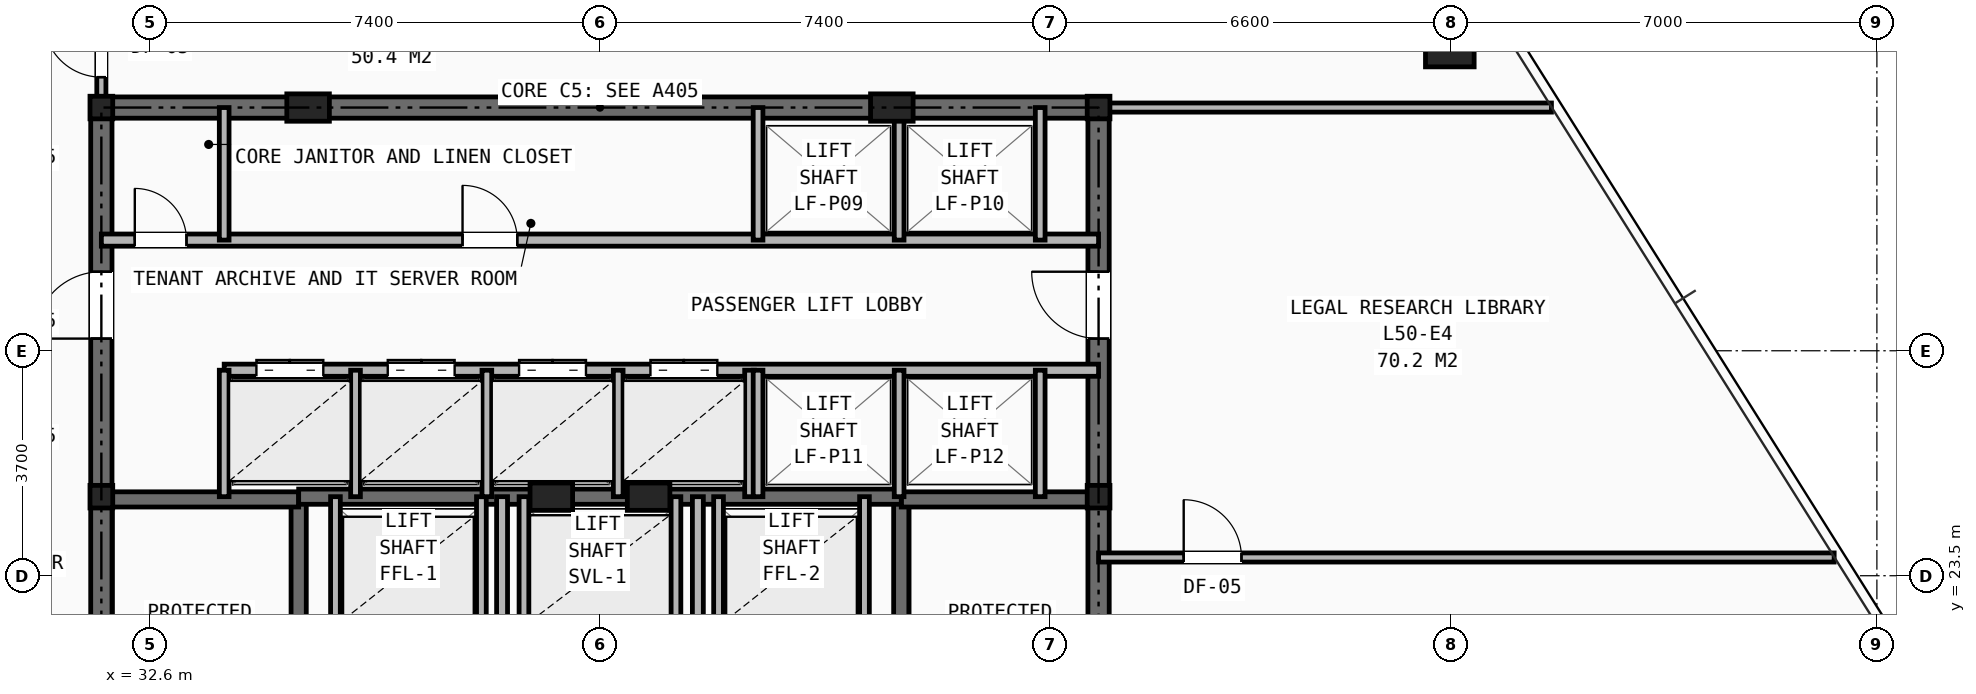
"""IFC4 building model, lengths in metres.
Left out: names, types, materials, properties, quantities, classifications, styles, units other than length and angle.
Written with IfcOpenShell. Run it as: python <this file> out.ifc"""

import sys

from ifc_helpers import new_model, si_unit, direction, frame, frame_2d, origin, origin_2d, place, context, subcontext, project, spatial, rectangle, hollow_rectangle, i_section, extrude, element, fill, save


model = new_model("IFC4")
c1 = context("Model", 3, precision=1e-05, world=origin(), true_north=direction((0.0, 1.0)))
c2 = subcontext(c1, "Body", "Model", "MODEL_VIEW")
j1 = project(units=[si_unit("LENGTHUNIT", "METRE"), si_unit("PLANEANGLEUNIT", "RADIAN")], contexts=[c1])
p1 = place(None, origin())
s1 = spatial("IfcSite", under=j1, at=p1, CompositionType="ELEMENT")
p2 = place(p1, origin())
s2 = spatial("IfcBuilding", under=s1, at=p2, CompositionType="ELEMENT")
p3 = place(p2, frame((0.0, 0.0, 175.8)))
s3 = spatial("IfcBuildingStorey", under=s2, at=p3, CompositionType="ELEMENT", Elevation=175.8)
for number, where, z_axis, x_axis in (
    (1, (31.8, 24.8, 0.0), (0.0, 0.0, 1.0), (1.0, 0.0, 0.0)),
    (2, (48.2, 24.8, 0.0), (0.0, 0.0, 1.0), (1.0, 0.0, 0.0)),
    (3, (31.8, 31.2, 0.0), (0.0, 0.0, 1.0), (1.0, 0.0, 0.0)),
    (4, (48.2, 31.2, 0.0), (0.0, 0.0, 1.0), (1.0, 0.0, 0.0)),
):
    element("IfcColumn", number, at=place(p3, frame(where, z_axis=z_axis, x_axis=x_axis)), inside=s3, PredefinedType="COLUMN", context=c2, shape_type="SweptSolid", body=[
        extrude(i_section(OverallWidth=0.374, OverallDepth=0.372, WebThickness=0.016, FlangeThickness=0.026, at=origin_2d()), origin(), (0.0, 0.0, 1.0), 3.45),
    ])
for number, where, z_axis, x_axis in (
    (5, (35.2, 31.2, 0.0), (0.0, 0.0, 1.0), (1.0, 0.0, 0.0)),
    (6, (44.8, 31.2, 0.0), (0.0, 0.0, 1.0), (1.0, 0.0, 0.0)),
    (7, (39.2, 24.8, 0.0), (0.0, 0.0, 1.0), (1.0, 0.0, 0.0)),
    (8, (40.8, 24.8, 0.0), (0.0, 0.0, 1.0), (1.0, 0.0, 0.0)),
):
    element("IfcColumn", number, at=place(p3, frame(where, z_axis=z_axis, x_axis=x_axis)), inside=s3, PredefinedType="PILASTER", context=c2, shape_type="SweptSolid", body=[
        extrude(rectangle(XDim=0.7, YDim=0.45, at=origin_2d()), origin(), (0.0, 0.0, 1.0), 3.45),
    ])
p4 = place(p3, frame((53.976, 32.269, 0.0), z_axis=(0.0, 0.0, 1.0), x_axis=(1.0, 0.0, 0.0)))
e9 = element("IfcColumn", 9, at=p4, inside=s3, PredefinedType="COLUMN", context=c2, shape_type="SweptSolid", body=[
    extrude(hollow_rectangle(XDim=0.8, YDim=0.8, WallThickness=0.055, at=origin_2d()), origin(), (0.0, 0.0, 1.0), 3.45),
])
p5 = place(p3, frame((31.8, 31.2, 0.0), z_axis=(0.0, 0.0, 1.0), x_axis=(1.0, 0.0, 0.0)))
e10 = element("IfcWall", 10, at=p5, inside=s3, PredefinedType="SHEAR", context=c2, shape_type="SweptSolid", body=[
    extrude(rectangle(XDim=16.4, YDim=0.35, at=frame_2d((8.2, 0.0))), origin(), (0.0, 0.0, 1.0), 3.21),
])
p6 = place(p3, frame((31.8, 16.4, 0.0), z_axis=(0.0, 0.0, 1.0), x_axis=(0.0, 1.0, 0.0)))
e11 = element("IfcWall", 11, at=p6, inside=s3, PredefinedType="SHEAR", context=c2, shape_type="SweptSolid", body=[
    extrude(rectangle(XDim=14.8, YDim=0.35, at=frame_2d((7.4, 0.0))), origin(), (0.0, 0.0, 1.0), 3.21),
])
p7 = place(p6, frame((11.0, 0.0, 0.0)))
e12 = element("IfcOpeningElement", 12, at=p7, cuts=e11, PredefinedType="OPENING", context=c2, shape_type="SweptSolid", body=[
    extrude(rectangle(XDim=1.1, YDim=2.15, at=frame_2d((0.55, 1.075))), frame((0.0, 0.185, 0.0), z_axis=(0.0, -1.0, 0.0), x_axis=(1.0, 0.0, 0.0)), (0.0, 0.0, 1.0), 0.37),
])
p8 = place(p3, frame((48.2, 16.4, 0.0), z_axis=(0.0, 0.0, 1.0), x_axis=(0.0, 1.0, 0.0)))
e13 = element("IfcWall", 13, at=p8, inside=s3, PredefinedType="SHEAR", context=c2, shape_type="SweptSolid", body=[
    extrude(rectangle(XDim=14.8, YDim=0.35, at=frame_2d((7.4, 0.0))), origin(), (0.0, 0.0, 1.0), 3.21),
])
p9 = place(p8, frame((11.0, 0.0, 0.0)))
e14 = element("IfcOpeningElement", 14, at=p9, cuts=e13, PredefinedType="OPENING", context=c2, shape_type="SweptSolid", body=[
    extrude(rectangle(XDim=1.1, YDim=2.15, at=frame_2d((0.55, 1.075))), frame((0.0, 0.185, 0.0), z_axis=(0.0, -1.0, 0.0), x_axis=(1.0, 0.0, 0.0)), (0.0, 0.0, 1.0), 0.37),
])
p10 = place(p3, frame((35.045, 16.4, 0.0), z_axis=(0.0, 0.0, 1.0), x_axis=(0.0, 1.0, 0.0)))
e15 = element("IfcWall", 15, at=p10, inside=s3, PredefinedType="SHEAR", context=c2, shape_type="SweptSolid", body=[
    extrude(rectangle(XDim=8.4, YDim=0.25, at=frame_2d((4.2, 0.0))), origin(), (0.0, 0.0, 1.0), 3.21),
])
p11 = place(p10, frame((0.45, 0.0, 0.0)))
e16 = element("IfcOpeningElement", 16, at=p11, cuts=e15, PredefinedType="OPENING", context=c2, shape_type="SweptSolid", body=[
    extrude(rectangle(XDim=0.95, YDim=2.1, at=frame_2d((0.475, 1.05))), frame((0.0, 0.135, 0.0), z_axis=(0.0, -1.0, 0.0), x_axis=(1.0, 0.0, 0.0)), (0.0, 0.0, 1.0), 0.27),
])
p12 = place(p3, frame((31.8, 24.755, 0.0), z_axis=(0.0, 0.0, 1.0), x_axis=(1.0, 0.0, 0.0)))
e17 = element("IfcWall", 17, at=p12, inside=s3, PredefinedType="SHEAR", context=c2, shape_type="SweptSolid", body=[
    extrude(rectangle(XDim=3.245, YDim=0.25, at=frame_2d((1.623, 0.0))), origin(), (0.0, 0.0, 1.0), 3.21),
])
p13 = place(p3, frame((44.955, 16.4, 0.0), z_axis=(0.0, 0.0, 1.0), x_axis=(0.0, 1.0, 0.0)))
e18 = element("IfcWall", 18, at=p13, inside=s3, PredefinedType="SHEAR", context=c2, shape_type="SweptSolid", body=[
    extrude(rectangle(XDim=8.4, YDim=0.25, at=frame_2d((4.2, 0.0))), origin(), (0.0, 0.0, 1.0), 3.21),
])
p14 = place(p13, frame((0.45, 0.0, 0.0)))
e19 = element("IfcOpeningElement", 19, at=p14, cuts=e18, PredefinedType="OPENING", context=c2, shape_type="SweptSolid", body=[
    extrude(rectangle(XDim=0.95, YDim=2.1, at=frame_2d((0.475, 1.05))), frame((0.0, 0.135, 0.0), z_axis=(0.0, -1.0, 0.0), x_axis=(1.0, 0.0, 0.0)), (0.0, 0.0, 1.0), 0.27),
])
p15 = place(p3, frame((44.955, 24.755, 0.0), z_axis=(0.0, 0.0, 1.0), x_axis=(1.0, 0.0, 0.0)))
e20 = element("IfcWall", 20, at=p15, inside=s3, PredefinedType="SHEAR", context=c2, shape_type="SweptSolid", body=[
    extrude(rectangle(XDim=3.245, YDim=0.25, at=frame_2d((1.623, 0.0))), origin(), (0.0, 0.0, 1.0), 3.21),
])
p16 = place(p3, frame((35.045, 24.8, 0.0), z_axis=(0.0, 0.0, 1.0), x_axis=(1.0, 0.0, 0.0)))
e21 = element("IfcWall", 21, at=p16, inside=s3, PredefinedType="SHEAR", context=c2, shape_type="SweptSolid", body=[
    extrude(rectangle(XDim=9.91, YDim=0.25, at=frame_2d((4.955, 0.0))), origin(), (0.0, 0.0, 1.0), 3.21),
])
p17 = place(p3, frame((38.39, 16.4, 0.0), z_axis=(0.0, 0.0, 1.0), x_axis=(0.0, 1.0, 0.0)))
e22 = element("IfcWall", 22, at=p17, inside=s3, PredefinedType="PARTITIONING", context=c2, shape_type="SweptSolid", body=[
    extrude(rectangle(XDim=8.4, YDim=0.18, at=frame_2d((4.2, 0.0))), origin(), (0.0, 0.0, 1.0), 2.938),
])
p18 = place(p17, frame((3.8, 0.0, 0.0)))
e23 = element("IfcOpeningElement", 23, at=p18, cuts=e22, PredefinedType="OPENING", context=c2, shape_type="SweptSolid", body=[
    extrude(rectangle(XDim=0.95, YDim=2.1, at=frame_2d((0.475, 1.05))), frame((0.0, 0.1, 0.0), z_axis=(0.0, -1.0, 0.0), x_axis=(1.0, 0.0, 0.0)), (0.0, 0.0, 1.0), 0.2),
])
p19 = place(p3, frame((41.61, 16.4, 0.0), z_axis=(0.0, 0.0, 1.0), x_axis=(0.0, 1.0, 0.0)))
e24 = element("IfcWall", 24, at=p19, inside=s3, PredefinedType="PARTITIONING", context=c2, shape_type="SweptSolid", body=[
    extrude(rectangle(XDim=8.4, YDim=0.18, at=frame_2d((4.2, 0.0))), origin(), (0.0, 0.0, 1.0), 2.938),
])
for number, where, z_axis, x_axis in (
    (25, (35.65, 22.48, 0.0), (0.0, 0.0, 1.0), (0.0, 1.0, 0.0)),
    (26, (38.05, 22.48, 0.0), (0.0, 0.0, 1.0), (0.0, 1.0, 0.0)),
    (27, (41.95, 22.48, 0.0), (0.0, 0.0, 1.0), (0.0, 1.0, 0.0)),
    (28, (44.35, 22.48, 0.0), (0.0, 0.0, 1.0), (0.0, 1.0, 0.0)),
    (29, (38.75, 22.48, 0.0), (0.0, 0.0, 1.0), (0.0, 1.0, 0.0)),
    (30, (41.25, 22.48, 0.0), (0.0, 0.0, 1.0), (0.0, 1.0, 0.0)),
):
    element("IfcWall", number, at=place(p3, frame(where, z_axis=z_axis, x_axis=x_axis)), inside=s3, PredefinedType="SOLIDWALL", context=c2, shape_type="SweptSolid", body=[
        extrude(rectangle(XDim=2.32, YDim=0.16, at=frame_2d((1.16, 0.0))), origin(), (0.0, 0.0, 1.0), 3.21),
    ])
p20 = place(p3, frame((31.8, 29.02, 0.0), z_axis=(0.0, 0.0, 1.0), x_axis=(1.0, 0.0, 0.0)))
e31 = element("IfcWall", 31, at=p20, inside=s3, PredefinedType="SOLIDWALL", context=c2, shape_type="SweptSolid", body=[
    extrude(rectangle(XDim=16.4, YDim=0.2, at=frame_2d((8.2, 0.0))), origin(), (0.0, 0.0, 1.0), 2.665),
])
p21 = place(p20, frame((0.55, 0.0, 0.0)))
e32 = element("IfcOpeningElement", 32, at=p21, cuts=e31, PredefinedType="OPENING", context=c2, shape_type="SweptSolid", body=[
    extrude(rectangle(XDim=0.85, YDim=2.05, at=frame_2d((0.425, 1.025))), frame((0.0, 0.11, 0.0), z_axis=(0.0, -1.0, 0.0), x_axis=(1.0, 0.0, 0.0)), (0.0, 0.0, 1.0), 0.22),
])
p22 = place(p20, frame((5.94, 0.0, 0.0)))
e33 = element("IfcOpeningElement", 33, at=p22, cuts=e31, PredefinedType="OPENING", context=c2, shape_type="SweptSolid", body=[
    extrude(rectangle(XDim=0.9, YDim=2.1, at=frame_2d((0.45, 1.05))), frame((0.0, 0.11, 0.0), z_axis=(0.0, -1.0, 0.0), x_axis=(1.0, 0.0, 0.0)), (0.0, 0.0, 1.0), 0.22),
])
p23 = place(p3, frame((33.82, 26.88, 0.0), z_axis=(0.0, 0.0, 1.0), x_axis=(1.0, 0.0, 0.0)))
e34 = element("IfcWall", 34, at=p23, inside=s3, PredefinedType="SOLIDWALL", context=c2, shape_type="SweptSolid", body=[
    extrude(rectangle(XDim=14.38, YDim=0.2, at=frame_2d((7.19, 0.0))), origin(), (0.0, 0.0, 1.0), 2.665),
])
p24 = place(p23, frame((0.53, 0.0, 0.0)))
e35 = element("IfcOpeningElement", 35, at=p24, cuts=e34, PredefinedType="OPENING", context=c2, shape_type="SweptSolid", body=[
    extrude(rectangle(XDim=1.1, YDim=2.15, at=frame_2d((0.55, 1.075))), frame((0.0, 0.11, 0.0), z_axis=(0.0, -1.0, 0.0), x_axis=(1.0, 0.0, 0.0)), (0.0, 0.0, 1.0), 0.22),
])
p25 = place(p23, frame((2.69, 0.0, 0.0)))
e36 = element("IfcOpeningElement", 36, at=p25, cuts=e34, PredefinedType="OPENING", context=c2, shape_type="SweptSolid", body=[
    extrude(rectangle(XDim=1.1, YDim=2.15, at=frame_2d((0.55, 1.075))), frame((0.0, 0.11, 0.0), z_axis=(0.0, -1.0, 0.0), x_axis=(1.0, 0.0, 0.0)), (0.0, 0.0, 1.0), 0.22),
])
p26 = place(p23, frame((4.85, 0.0, 0.0)))
e37 = element("IfcOpeningElement", 37, at=p26, cuts=e34, PredefinedType="OPENING", context=c2, shape_type="SweptSolid", body=[
    extrude(rectangle(XDim=1.1, YDim=2.15, at=frame_2d((0.55, 1.075))), frame((0.0, 0.11, 0.0), z_axis=(0.0, -1.0, 0.0), x_axis=(1.0, 0.0, 0.0)), (0.0, 0.0, 1.0), 0.22),
])
p27 = place(p23, frame((7.01, 0.0, 0.0)))
e38 = element("IfcOpeningElement", 38, at=p27, cuts=e34, PredefinedType="OPENING", context=c2, shape_type="SweptSolid", body=[
    extrude(rectangle(XDim=1.1, YDim=2.15, at=frame_2d((0.55, 1.075))), frame((0.0, 0.11, 0.0), z_axis=(0.0, -1.0, 0.0), x_axis=(1.0, 0.0, 0.0)), (0.0, 0.0, 1.0), 0.22),
])
p28 = place(p3, frame((33.82, 29.02, 0.0), z_axis=(0.0, 0.0, 1.0), x_axis=(0.0, 1.0, 0.0)))
e39 = element("IfcWall", 39, at=p28, inside=s3, PredefinedType="SOLIDWALL", context=c2, shape_type="SweptSolid", body=[
    extrude(rectangle(XDim=2.18, YDim=0.16, at=frame_2d((1.09, 0.0))), origin(), (0.0, 0.0, 1.0), 2.938),
])
for number, where, z_axis, x_axis in (
    (40, (33.82, 24.8, 0.0), (0.0, 0.0, 1.0), (0.0, 1.0, 0.0)),
    (41, (35.98, 24.8, 0.0), (0.0, 0.0, 1.0), (0.0, 1.0, 0.0)),
    (42, (38.14, 24.8, 0.0), (0.0, 0.0, 1.0), (0.0, 1.0, 0.0)),
    (43, (40.3, 24.8, 0.0), (0.0, 0.0, 1.0), (0.0, 1.0, 0.0)),
    (44, (42.46, 24.8, 0.0), (0.0, 0.0, 1.0), (0.0, 1.0, 0.0)),
):
    element("IfcWall", number, at=place(p3, frame(where, z_axis=z_axis, x_axis=x_axis)), inside=s3, PredefinedType="SOLIDWALL", context=c2, shape_type="SweptSolid", body=[
        extrude(rectangle(XDim=2.08, YDim=0.16, at=frame_2d((1.04, 0.0))), origin(), (0.0, 0.0, 1.0), 3.21),
    ])
for number, where, z_axis, x_axis in (
    (45, (42.6, 29.02, 0.0), (0.0, 0.0, 1.0), (0.0, 1.0, 0.0)),
    (46, (44.92, 29.02, 0.0), (0.0, 0.0, 1.0), (0.0, 1.0, 0.0)),
    (47, (47.24, 29.02, 0.0), (0.0, 0.0, 1.0), (0.0, 1.0, 0.0)),
):
    element("IfcWall", number, at=place(p3, frame(where, z_axis=z_axis, x_axis=x_axis)), inside=s3, PredefinedType="SOLIDWALL", context=c2, shape_type="SweptSolid", body=[
        extrude(rectangle(XDim=2.18, YDim=0.16, at=frame_2d((1.09, 0.0))), origin(), (0.0, 0.0, 1.0), 2.938),
    ])
for number, where, z_axis, x_axis in (
    (48, (42.6, 24.8, 0.0), (0.0, 0.0, 1.0), (0.0, 1.0, 0.0)),
    (49, (44.92, 24.8, 0.0), (0.0, 0.0, 1.0), (0.0, 1.0, 0.0)),
    (50, (47.24, 24.8, 0.0), (0.0, 0.0, 1.0), (0.0, 1.0, 0.0)),
):
    element("IfcWall", number, at=place(p3, frame(where, z_axis=z_axis, x_axis=x_axis)), inside=s3, PredefinedType="SOLIDWALL", context=c2, shape_type="SweptSolid", body=[
        extrude(rectangle(XDim=2.08, YDim=0.16, at=frame_2d((1.04, 0.0))), origin(), (0.0, 0.0, 1.0), 3.21),
    ])
p29 = place(p3, frame((31.8, 31.2, 0.0), z_axis=(0.0, 0.0, 1.0), x_axis=(0.0, 1.0, 0.0)))
e51 = element("IfcWall", 51, at=p29, inside=s3, PredefinedType="PARTITIONING", context=c2, shape_type="SweptSolid", body=[
    extrude(rectangle(XDim=5.3, YDim=0.15, at=frame_2d((2.65, 0.0))), origin(), (0.0, 0.0, 1.0), 2.252),
])
p30 = place(p29, frame((0.5, 0.0, 0.0)))
e52 = element("IfcOpeningElement", 52, at=p30, cuts=e51, PredefinedType="OPENING", context=c2, shape_type="SweptSolid", body=[
    extrude(rectangle(XDim=0.95, YDim=2.1, at=frame_2d((0.475, 1.05))), frame((0.0, 0.085, 0.0), z_axis=(0.0, -1.0, 0.0), x_axis=(1.0, 0.0, 0.0)), (0.0, 0.0, 1.0), 0.17),
])
p31 = place(p29, frame((2.9, 0.0, 0.0)))
e53 = element("IfcOpeningElement", 53, at=p31, cuts=e51, PredefinedType="OPENING", context=c2, shape_type="SweptSolid", body=[
    extrude(rectangle(XDim=0.95, YDim=2.1, at=frame_2d((0.475, 1.05))), frame((0.0, 0.085, 0.0), z_axis=(0.0, -1.0, 0.0), x_axis=(1.0, 0.0, 0.0)), (0.0, 0.0, 1.0), 0.17),
])
p32 = place(p3, frame((48.2, 31.2, 0.0), z_axis=(0.0, 0.0, 1.0), x_axis=(1.0, 0.0, 0.0)))
e54 = element("IfcWall", 54, at=p32, inside=s3, PredefinedType="PARTITIONING", context=c2, shape_type="SweptSolid", body=[
    extrude(rectangle(XDim=7.448, YDim=0.15, at=frame_2d((3.724, 0.0))), origin(), (0.0, 0.0, 1.0), 2.252),
])
p33 = place(p3, frame((48.2, 23.8, 0.0), z_axis=(0.0, 0.0, 1.0), x_axis=(1.0, 0.0, 0.0)))
e55 = element("IfcWall", 55, at=p33, inside=s3, PredefinedType="PARTITIONING", context=c2, shape_type="SweptSolid", body=[
    extrude(rectangle(XDim=12.097, YDim=0.15, at=frame_2d((6.049, 0.0))), origin(), (0.0, 0.0, 1.0), 2.589),
])
p34 = place(p33, frame((1.4, 0.0, 0.0)))
e56 = element("IfcOpeningElement", 56, at=p34, cuts=e55, PredefinedType="OPENING", context=c2, shape_type="SweptSolid", body=[
    extrude(rectangle(XDim=0.95, YDim=2.1, at=frame_2d((0.475, 1.05))), frame((0.0, 0.085, 0.0), z_axis=(0.0, -1.0, 0.0), x_axis=(1.0, 0.0, 0.0)), (0.0, 0.0, 1.0), 0.17),
])
p35 = place(p21, origin())
e57 = element("IfcDoor", 57, at=p35, inside=s3, OperationType="SINGLE_SWING_LEFT", PredefinedType="DOOR", context=c2, shape_type="SweptSolid", body=[
    extrude(rectangle(XDim=0.85, YDim=2.05, at=frame_2d((0.425, 1.025))), frame((0.0, 0.025, 0.0), z_axis=(0.0, -1.0, 0.0), x_axis=(1.0, 0.0, 0.0)), (0.0, 0.0, 1.0), 0.05),
])
fill(e32, e57)
p36 = place(p7, origin())
e58 = element("IfcDoor", 58, at=p36, inside=s3, OperationType="SINGLE_SWING_LEFT", PredefinedType="DOOR", context=c2, shape_type="SweptSolid", body=[
    extrude(rectangle(XDim=1.1, YDim=2.15, at=frame_2d((0.55, 1.075))), frame((0.0, 0.025, 0.0), z_axis=(0.0, -1.0, 0.0), x_axis=(1.0, 0.0, 0.0)), (0.0, 0.0, 1.0), 0.05),
])
fill(e12, e58)
p37 = place(p9, origin())
e59 = element("IfcDoor", 59, at=p37, inside=s3, OperationType="SINGLE_SWING_RIGHT", PredefinedType="DOOR", context=c2, shape_type="SweptSolid", body=[
    extrude(rectangle(XDim=1.1, YDim=2.15, at=frame_2d((0.55, 1.075))), frame((0.0, 0.025, 0.0), z_axis=(0.0, -1.0, 0.0), x_axis=(1.0, 0.0, 0.0)), (0.0, 0.0, 1.0), 0.05),
])
fill(e14, e59)
p38 = place(p22, origin())
e60 = element("IfcDoor", 60, at=p38, inside=s3, OperationType="SINGLE_SWING_LEFT", PredefinedType="DOOR", context=c2, shape_type="SweptSolid", body=[
    extrude(rectangle(XDim=0.9, YDim=2.1, at=frame_2d((0.45, 1.05))), frame((0.0, 0.025, 0.0), z_axis=(0.0, -1.0, 0.0), x_axis=(1.0, 0.0, 0.0)), (0.0, 0.0, 1.0), 0.05),
])
fill(e33, e60)
p39 = place(p24, origin())
e61 = element("IfcDoor", 61, at=p39, inside=s3, OperationType="DOUBLE_DOOR_SLIDING", PredefinedType="DOOR", context=c2, shape_type="SweptSolid", body=[
    extrude(rectangle(XDim=1.1, YDim=2.15, at=frame_2d((0.55, 1.075))), frame((0.0, 0.025, 0.0), z_axis=(0.0, -1.0, 0.0), x_axis=(1.0, 0.0, 0.0)), (0.0, 0.0, 1.0), 0.05),
])
fill(e35, e61)
p40 = place(p25, origin())
e62 = element("IfcDoor", 62, at=p40, inside=s3, OperationType="DOUBLE_DOOR_SLIDING", PredefinedType="DOOR", context=c2, shape_type="SweptSolid", body=[
    extrude(rectangle(XDim=1.1, YDim=2.15, at=frame_2d((0.55, 1.075))), frame((0.0, 0.025, 0.0), z_axis=(0.0, -1.0, 0.0), x_axis=(1.0, 0.0, 0.0)), (0.0, 0.0, 1.0), 0.05),
])
fill(e36, e62)
p41 = place(p26, origin())
e63 = element("IfcDoor", 63, at=p41, inside=s3, OperationType="DOUBLE_DOOR_SLIDING", PredefinedType="DOOR", context=c2, shape_type="SweptSolid", body=[
    extrude(rectangle(XDim=1.1, YDim=2.15, at=frame_2d((0.55, 1.075))), frame((0.0, 0.025, 0.0), z_axis=(0.0, -1.0, 0.0), x_axis=(1.0, 0.0, 0.0)), (0.0, 0.0, 1.0), 0.05),
])
fill(e37, e63)
p42 = place(p27, origin())
e64 = element("IfcDoor", 64, at=p42, inside=s3, OperationType="DOUBLE_DOOR_SLIDING", PredefinedType="DOOR", context=c2, shape_type="SweptSolid", body=[
    extrude(rectangle(XDim=1.1, YDim=2.15, at=frame_2d((0.55, 1.075))), frame((0.0, 0.025, 0.0), z_axis=(0.0, -1.0, 0.0), x_axis=(1.0, 0.0, 0.0)), (0.0, 0.0, 1.0), 0.05),
])
fill(e38, e64)
p43 = place(p30, origin())
e65 = element("IfcDoor", 65, at=p43, inside=s3, OperationType="SINGLE_SWING_RIGHT", PredefinedType="DOOR", context=c2, shape_type="SweptSolid", body=[
    extrude(rectangle(XDim=0.95, YDim=2.1, at=frame_2d((0.475, 1.05))), frame((0.0, 0.025, 0.0), z_axis=(0.0, -1.0, 0.0), x_axis=(1.0, 0.0, 0.0)), (0.0, 0.0, 1.0), 0.05),
])
fill(e52, e65)
p44 = place(p34, origin())
e66 = element("IfcDoor", 66, at=p44, inside=s3, OperationType="SINGLE_SWING_LEFT", PredefinedType="DOOR", context=c2, shape_type="SweptSolid", body=[
    extrude(rectangle(XDim=0.95, YDim=2.1, at=frame_2d((0.475, 1.05))), frame((0.0, 0.025, 0.0), z_axis=(0.0, -1.0, 0.0), x_axis=(1.0, 0.0, 0.0)), (0.0, 0.0, 1.0), 0.05),
])
fill(e56, e66)
save(model, sys.argv[1])
